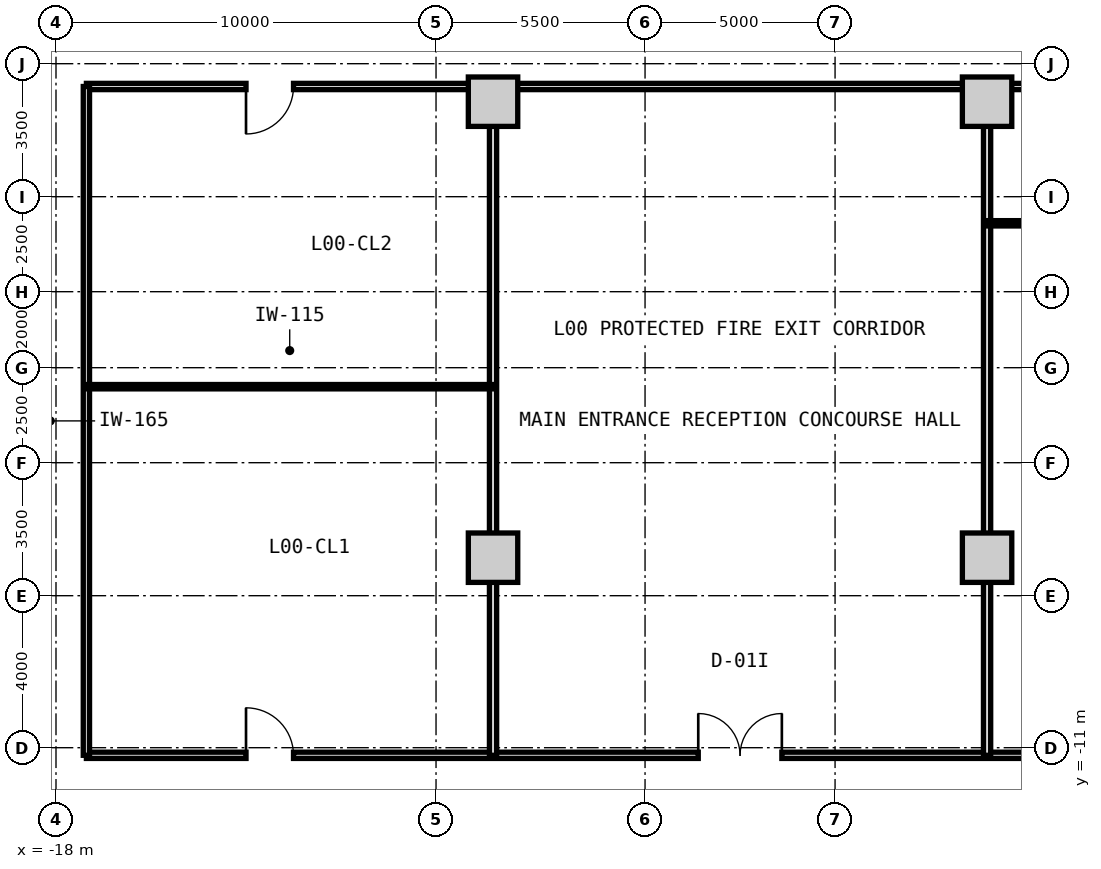
"""IFC4 building model, lengths in metres.
Left out: names, types, materials, properties, quantities, classifications, styles, units other than length and angle.
Written with IfcOpenShell. Run it as: python <this file> out.ifc"""

import sys

from ifc_helpers import new_model, si_unit, direction, frame, frame_2d, origin, origin_2d, place, context, subcontext, project, spatial, rectangle, extrude, source, transform, mapped, element, fill, save


model = new_model("IFC4")
c1 = context("Model", 3, precision=1e-05, world=origin(), true_north=direction((0.0, 1.0)))
c2 = subcontext(c1, "Body", "Model", "MODEL_VIEW")
j1 = project(units=[si_unit("LENGTHUNIT", "METRE"), si_unit("PLANEANGLEUNIT", "RADIAN")], contexts=[c1])
p1 = place(None, origin())
s1 = spatial("IfcSite", under=j1, at=p1, CompositionType="ELEMENT")
p2 = place(p1, origin())
s2 = spatial("IfcBuilding", under=s1, at=p2, CompositionType="ELEMENT")
p3 = place(p2, origin())
s3 = spatial("IfcBuildingStorey", under=s2, at=p3, CompositionType="ELEMENT", Elevation=0.0)
m1 = source(origin(), c2, "Body", "SweptSolid", [
    extrude(rectangle(XDim=1.3, YDim=1.3, at=origin_2d()), origin(), (0.0, 0.0, 1.0), 4.2),
])
for number, where, z_axis, x_axis in (
    (1, (-6.5, -6.0, 0.0), (0.0, 0.0, 1.0), (1.0, 0.0, 0.0)),
    (2, (-6.5, 6.0, 0.0), (0.0, 0.0, 1.0), (1.0, 0.0, 0.0)),
    (3, (6.5, -6.0, 0.0), (0.0, 0.0, 1.0), (1.0, 0.0, 0.0)),
    (4, (6.5, 6.0, 0.0), (0.0, 0.0, 1.0), (1.0, 0.0, 0.0)),
):
    element("IfcColumn", number, at=place(p3, frame(where, z_axis=z_axis, x_axis=x_axis)), inside=s3, PredefinedType="COLUMN", context=c2, shape_type="MappedRepresentation", body=[
        mapped(m1, transform((0.0, 0.0, 0.0), x_axis=(1.0, 0.0, 0.0), y_axis=(0.0, 1.0, 0.0), z_axis=(0.0, 0.0, 1.0), scale=1.0)),
    ])
m2 = source(origin(), c2, "Body", "SweptSolid", [
    extrude(rectangle(XDim=34.4, YDim=0.165, at=frame_2d((17.2, 0.0))), origin(), (0.0, 0.0, 1.0), 3.865),
])
p4 = place(p3, frame((-17.2, -11.2, 0.0), z_axis=(0.0, 0.0, 1.0), x_axis=(1.0, 0.0, 0.0)))
e5 = element("IfcWall", 5, at=p4, inside=s3, PredefinedType="PARTITIONING", context=c2, shape_type="MappedRepresentation", body=[
    mapped(m2, transform((0.0, 0.0, 0.0), x_axis=(1.0, 0.0, 0.0), y_axis=(0.0, 1.0, 0.0), z_axis=(0.0, 0.0, 1.0), scale=1.0)),
])
p5 = place(p4, frame((4.2, 0.0, 0.0)))
e6 = element("IfcOpeningElement", 6, at=p5, cuts=e5, PredefinedType="OPENING", context=c2, shape_type="SweptSolid", body=[
    extrude(rectangle(XDim=1.25, YDim=2.2, at=frame_2d((0.625, 1.1))), frame((0.0, 0.093, 0.0), z_axis=(0.0, -1.0, 0.0), x_axis=(1.0, 0.0, 0.0)), (0.0, 0.0, 1.0), 0.185),
])
p6 = place(p4, frame((16.1, 0.0, 0.0)))
e7 = element("IfcOpeningElement", 7, at=p6, cuts=e5, PredefinedType="OPENING", context=c2, shape_type="SweptSolid", body=[
    extrude(rectangle(XDim=2.2, YDim=2.4, at=frame_2d((1.1, 1.2))), frame((0.0, 0.093, 0.0), z_axis=(0.0, -1.0, 0.0), x_axis=(1.0, 0.0, 0.0)), (0.0, 0.0, 1.0), 0.185),
])
p7 = place(p4, frame((27.5, 0.0, 0.0)))
e8 = element("IfcOpeningElement", 8, at=p7, cuts=e5, PredefinedType="OPENING", context=c2, shape_type="SweptSolid", body=[
    extrude(rectangle(XDim=1.25, YDim=2.2, at=frame_2d((0.625, 1.1))), frame((0.0, 0.093, 0.0), z_axis=(0.0, -1.0, 0.0), x_axis=(1.0, 0.0, 0.0)), (0.0, 0.0, 1.0), 0.185),
])
p8 = place(p3, frame((-17.2, 6.4, 0.0), z_axis=(0.0, 0.0, 1.0), x_axis=(1.0, 0.0, 0.0)))
e9 = element("IfcWall", 9, at=p8, inside=s3, PredefinedType="PARTITIONING", context=c2, shape_type="MappedRepresentation", body=[
    mapped(m2, transform((0.0, 0.0, 0.0), x_axis=(1.0, 0.0, 0.0), y_axis=(0.0, 1.0, 0.0), z_axis=(0.0, 0.0, 1.0), scale=1.0)),
])
p9 = place(p8, frame((4.2, 0.0, 0.0)))
e10 = element("IfcOpeningElement", 10, at=p9, cuts=e9, PredefinedType="OPENING", context=c2, shape_type="SweptSolid", body=[
    extrude(rectangle(XDim=1.25, YDim=2.2, at=frame_2d((0.625, 1.1))), frame((0.0, 0.093, 0.0), z_axis=(0.0, -1.0, 0.0), x_axis=(1.0, 0.0, 0.0)), (0.0, 0.0, 1.0), 0.185),
])
p10 = place(p8, frame((25.5, 0.0, 0.0)))
e11 = element("IfcOpeningElement", 11, at=p10, cuts=e9, PredefinedType="OPENING", context=c2, shape_type="SweptSolid", body=[
    extrude(rectangle(XDim=0.92, YDim=2.1, at=frame_2d((0.46, 1.05))), frame((0.0, 0.093, 0.0), z_axis=(0.0, -1.0, 0.0), x_axis=(1.0, 0.0, 0.0)), (0.0, 0.0, 1.0), 0.185),
])
p11 = place(p8, frame((31.0, 0.0, 0.0)))
e12 = element("IfcOpeningElement", 12, at=p11, cuts=e9, PredefinedType="OPENING", context=c2, shape_type="SweptSolid", body=[
    extrude(rectangle(XDim=0.92, YDim=2.1, at=frame_2d((0.46, 1.05))), frame((0.0, 0.093, 0.0), z_axis=(0.0, -1.0, 0.0), x_axis=(1.0, 0.0, 0.0)), (0.0, 0.0, 1.0), 0.185),
])
m3 = source(origin(), c2, "Body", "SweptSolid", [
    extrude(rectangle(XDim=17.6, YDim=0.165, at=frame_2d((8.8, 0.0))), origin(), (0.0, 0.0, 1.0), 3.865),
])
p12 = place(p3, frame((-17.2, -11.2, 0.0), z_axis=(0.0, 0.0, 1.0), x_axis=(0.0, 1.0, 0.0)))
e13 = element("IfcWall", 13, at=p12, inside=s3, PredefinedType="PARTITIONING", context=c2, shape_type="MappedRepresentation", body=[
    mapped(m3, transform((0.0, 0.0, 0.0), x_axis=(1.0, 0.0, 0.0), y_axis=(0.0, 1.0, 0.0), z_axis=(0.0, 0.0, 1.0), scale=1.0)),
])
m4 = source(origin(), c2, "Body", "SweptSolid", [
    extrude(rectangle(XDim=17.6, YDim=0.19, at=frame_2d((8.8, 0.0))), origin(), (0.0, 0.0, 1.0), 3.215),
])
for number, where, z_axis, x_axis in (
    (14, (-6.5, -11.2, 0.0), (0.0, 0.0, 1.0), (0.0, 1.0, 0.0)),
    (15, (6.5, -11.2, 0.0), (0.0, 0.0, 1.0), (0.0, 1.0, 0.0)),
):
    element("IfcWall", number, at=place(p3, frame(where, z_axis=z_axis, x_axis=x_axis)), inside=s3, PredefinedType="PARTITIONING", context=c2, shape_type="MappedRepresentation", body=[
        mapped(m4, transform((0.0, 0.0, 0.0), x_axis=(1.0, 0.0, 0.0), y_axis=(0.0, 1.0, 0.0), z_axis=(0.0, 0.0, 1.0), scale=1.0)),
    ])
m5 = source(origin(), c2, "Body", "SweptSolid", [
    extrude(rectangle(XDim=10.7, YDim=0.115, at=frame_2d((5.35, 0.0))), origin(), (0.0, 0.0, 1.0), 3.865),
])
p13 = place(p3, frame((-17.2, -1.5, 0.0), z_axis=(0.0, 0.0, 1.0), x_axis=(1.0, 0.0, 0.0)))
e16 = element("IfcWall", 16, at=p13, inside=s3, PredefinedType="PARTITIONING", context=c2, shape_type="MappedRepresentation", body=[
    mapped(m5, transform((0.0, 0.0, 0.0), x_axis=(1.0, 0.0, 0.0), y_axis=(0.0, 1.0, 0.0), z_axis=(0.0, 0.0, 1.0), scale=1.0)),
])
m6 = source(origin(), c2, "Body", "SweptSolid", [
    extrude(rectangle(XDim=10.7, YDim=0.14, at=frame_2d((5.35, 0.0))), origin(), (0.0, 0.0, 1.0), 3.865),
])
p14 = place(p3, frame((6.5, 2.8, 0.0), z_axis=(0.0, 0.0, 1.0), x_axis=(1.0, 0.0, 0.0)))
e17 = element("IfcWall", 17, at=p14, inside=s3, PredefinedType="PARTITIONING", context=c2, shape_type="MappedRepresentation", body=[
    mapped(m6, transform((0.0, 0.0, 0.0), x_axis=(1.0, 0.0, 0.0), y_axis=(0.0, 1.0, 0.0), z_axis=(0.0, 0.0, 1.0), scale=1.0)),
])
m7 = source(origin(), c2, "Body", "SweptSolid", [
    extrude(rectangle(XDim=1.25, YDim=2.2, at=frame_2d((0.625, 1.1))), frame((0.0, 0.025, 0.0), z_axis=(0.0, -1.0, 0.0), x_axis=(1.0, 0.0, 0.0)), (0.0, 0.0, 1.0), 0.05),
])
p15 = place(p5, origin())
e18 = element("IfcDoor", 18, at=p15, inside=s3, OperationType="SINGLE_SWING_LEFT", PredefinedType="DOOR", context=c2, shape_type="MappedRepresentation", body=[
    mapped(m7, transform((0.0, 0.0, 0.0), x_axis=(1.0, 0.0, 0.0), y_axis=(0.0, 1.0, 0.0), z_axis=(0.0, 0.0, 1.0), scale=1.0)),
])
fill(e6, e18)
m8 = source(origin(), c2, "Body", "SweptSolid", [
    extrude(rectangle(XDim=2.2, YDim=2.4, at=frame_2d((1.1, 1.2))), frame((0.0, 0.025, 0.0), z_axis=(0.0, -1.0, 0.0), x_axis=(1.0, 0.0, 0.0)), (0.0, 0.0, 1.0), 0.05),
])
p16 = place(p6, origin())
e19 = element("IfcDoor", 19, at=p16, inside=s3, OperationType="DOUBLE_DOOR_SINGLE_SWING", PredefinedType="DOOR", context=c2, shape_type="MappedRepresentation", body=[
    mapped(m8, transform((0.0, 0.0, 0.0), x_axis=(1.0, 0.0, 0.0), y_axis=(0.0, 1.0, 0.0), z_axis=(0.0, 0.0, 1.0), scale=1.0)),
])
fill(e7, e19)
p17 = place(p9, frame((1.25, 0.0, 0.0), z_axis=(0.0, 0.0, 1.0), x_axis=(-1.0, 0.0, 0.0)))
e20 = element("IfcDoor", 20, at=p17, inside=s3, OperationType="SINGLE_SWING_RIGHT", PredefinedType="DOOR", context=c2, shape_type="MappedRepresentation", body=[
    mapped(m7, transform((0.0, 0.0, 0.0), x_axis=(1.0, 0.0, 0.0), y_axis=(0.0, 1.0, 0.0), z_axis=(0.0, 0.0, 1.0), scale=1.0)),
])
fill(e10, e20)
save(model, sys.argv[1])
